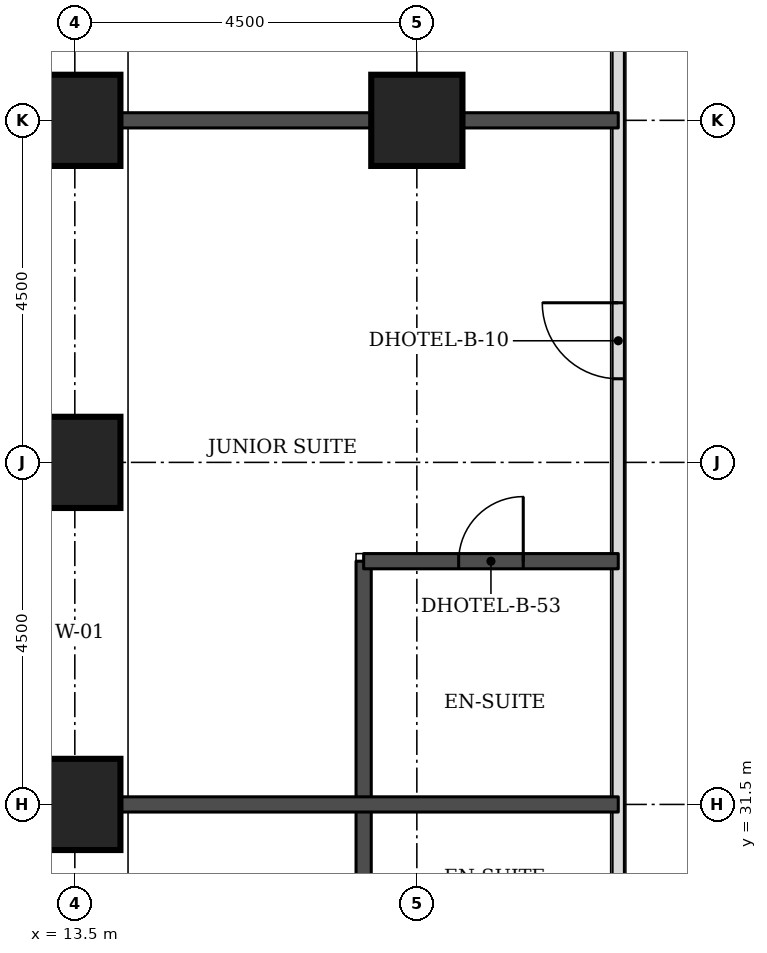
"""IFC4 building model, lengths in metres.
Left out: names, types, materials, properties, quantities, classifications, styles, units other than length and angle.
Written with IfcOpenShell. Run it as: python <this file> out.ifc"""

import sys

from ifc_helpers import new_model, si_unit, direction, frame, frame_2d, origin, origin_2d, place, context, subcontext, project, spatial, rectangle, extrude, element, fill, save


model = new_model("IFC4")
c1 = context("Model", 3, precision=1e-05, world=origin(), true_north=direction((0.0, 1.0)))
c2 = subcontext(c1, "Body", "Model", "MODEL_VIEW")
j1 = project(units=[si_unit("LENGTHUNIT", "METRE"), si_unit("PLANEANGLEUNIT", "RADIAN")], contexts=[c1])
p1 = place(None, origin())
s1 = spatial("IfcSite", under=j1, at=p1, CompositionType="ELEMENT")
p2 = place(p1, origin())
s2 = spatial("IfcBuilding", under=s1, at=p2, CompositionType="ELEMENT")
p3 = place(p2, frame((0.0, 0.0, 52.8)))
s3 = spatial("IfcBuildingStorey", under=s2, at=p3, CompositionType="ELEMENT", Elevation=52.8)
for number, where, z_axis, x_axis in (
    (1, (13.5, 31.5, 0.0), (0.0, 0.0, 1.0), (1.0, 0.0, 0.0)),
    (2, (13.5, 36.0, 0.0), (0.0, 0.0, 1.0), (1.0, 0.0, 0.0)),
    (3, (13.5, 40.5, 0.0), (0.0, 0.0, 1.0), (1.0, 0.0, 0.0)),
    (4, (18.0, 40.5, 0.0), (0.0, 0.0, 1.0), (1.0, 0.0, 0.0)),
):
    element("IfcColumn", number, at=place(p3, frame(where, z_axis=z_axis, x_axis=x_axis)), inside=s3, PredefinedType="COLUMN", context=c2, shape_type="SweptSolid", body=[
        extrude(rectangle(XDim=1.2, YDim=1.2, at=origin_2d()), origin(), (0.0, 0.0, 1.0), 3.3),
    ])
p4 = place(p3, frame((20.65, 23.65, 0.0), z_axis=(0.0, 0.0, 1.0), x_axis=(0.0, 1.0, 0.0)))
e5 = element("IfcWall", 5, at=p4, inside=s3, PredefinedType="PARTITIONING", context=c2, shape_type="SweptSolid", body=[
    extrude(rectangle(XDim=25.85, YDim=0.15, at=frame_2d((12.925, 0.0))), origin(), (0.0, 0.0, 1.0), 3.08),
])
p5 = place(p4, frame((1.5, 0.0, 0.0)))
e6 = element("IfcOpeningElement", 6, at=p5, cuts=e5, PredefinedType="OPENING", context=c2, shape_type="SweptSolid", body=[
    extrude(rectangle(XDim=1.0, YDim=2.1, at=frame_2d((0.5, 1.05))), frame((0.0, 0.085, 0.0), z_axis=(0.0, -1.0, 0.0), x_axis=(1.0, 0.0, 0.0)), (0.0, 0.0, 1.0), 0.17),
])
p6 = place(p4, frame((13.45, 0.0, 0.0)))
e7 = element("IfcOpeningElement", 7, at=p6, cuts=e5, PredefinedType="OPENING", context=c2, shape_type="SweptSolid", body=[
    extrude(rectangle(XDim=1.0, YDim=2.1, at=frame_2d((0.5, 1.05))), frame((0.0, 0.085, 0.0), z_axis=(0.0, -1.0, 0.0), x_axis=(1.0, 0.0, 0.0)), (0.0, 0.0, 1.0), 0.17),
])
p7 = place(p4, frame((19.5, 0.0, 0.0)))
e8 = element("IfcOpeningElement", 8, at=p7, cuts=e5, PredefinedType="OPENING", context=c2, shape_type="SweptSolid", body=[
    extrude(rectangle(XDim=1.0, YDim=2.1, at=frame_2d((0.5, 1.05))), frame((0.0, 0.085, 0.0), z_axis=(0.0, -1.0, 0.0), x_axis=(1.0, 0.0, 0.0)), (0.0, 0.0, 1.0), 0.17),
])
p8 = place(p3, frame((17.3, 28.8, 0.0), z_axis=(0.0, 0.0, 1.0), x_axis=(0.0, 1.0, 0.0)))
e9 = element("IfcWall", 9, at=p8, inside=s3, PredefinedType="SOLIDWALL", context=c2, shape_type="SweptSolid", body=[
    extrude(rectangle(XDim=5.9, YDim=0.2, at=frame_2d((2.95, 0.0))), origin(), (0.0, 0.0, 1.0), 3.08),
])
p9 = place(p3, frame((14.1, 31.5, 0.0), z_axis=(0.0, 0.0, 1.0), x_axis=(1.0, 0.0, 0.0)))
e10 = element("IfcWall", 10, at=p9, inside=s3, PredefinedType="SOLIDWALL", context=c2, shape_type="SweptSolid", body=[
    extrude(rectangle(XDim=6.55, YDim=0.2, at=frame_2d((3.275, 0.0))), origin(), (0.0, 0.0, 1.0), 3.08),
])
p10 = place(p3, frame((17.3, 34.7, 0.0), z_axis=(0.0, 0.0, 1.0), x_axis=(1.0, 0.0, 0.0)))
e11 = element("IfcWall", 11, at=p10, inside=s3, PredefinedType="SOLIDWALL", context=c2, shape_type="SweptSolid", body=[
    extrude(rectangle(XDim=3.35, YDim=0.2, at=frame_2d((1.675, 0.0))), origin(), (0.0, 0.0, 1.0), 3.08),
])
p11 = place(p10, frame((1.25, 0.0, 0.0)))
e12 = element("IfcOpeningElement", 12, at=p11, cuts=e11, PredefinedType="OPENING", context=c2, shape_type="SweptSolid", body=[
    extrude(rectangle(XDim=0.85, YDim=2.1, at=frame_2d((0.425, 1.05))), frame((0.0, 0.11, 0.0), z_axis=(0.0, -1.0, 0.0), x_axis=(1.0, 0.0, 0.0)), (0.0, 0.0, 1.0), 0.22),
])
p12 = place(p3, frame((14.1, 40.5, 0.0), z_axis=(0.0, 0.0, 1.0), x_axis=(1.0, 0.0, 0.0)))
e13 = element("IfcWall", 13, at=p12, inside=s3, PredefinedType="SOLIDWALL", context=c2, shape_type="SweptSolid", body=[
    extrude(rectangle(XDim=6.55, YDim=0.2, at=frame_2d((3.275, 0.0))), origin(), (0.0, 0.0, 1.0), 3.08),
])
p13 = place(p6, origin())
e14 = element("IfcDoor", 14, at=p13, inside=s3, OperationType="SINGLE_SWING_RIGHT", PredefinedType="DOOR", context=c2, shape_type="SweptSolid", body=[
    extrude(rectangle(XDim=1.0, YDim=2.1, at=frame_2d((0.5, 1.05))), frame((0.0, 0.025, 0.0), z_axis=(0.0, -1.0, 0.0), x_axis=(1.0, 0.0, 0.0)), (0.0, 0.0, 1.0), 0.05),
])
fill(e7, e14)
p14 = place(p11, origin())
e15 = element("IfcDoor", 15, at=p14, inside=s3, OperationType="SINGLE_SWING_RIGHT", PredefinedType="DOOR", context=c2, shape_type="SweptSolid", body=[
    extrude(rectangle(XDim=0.85, YDim=2.1, at=frame_2d((0.425, 1.05))), frame((0.0, 0.025, 0.0), z_axis=(0.0, -1.0, 0.0), x_axis=(1.0, 0.0, 0.0)), (0.0, 0.0, 1.0), 0.05),
])
fill(e12, e15)
save(model, sys.argv[1])
